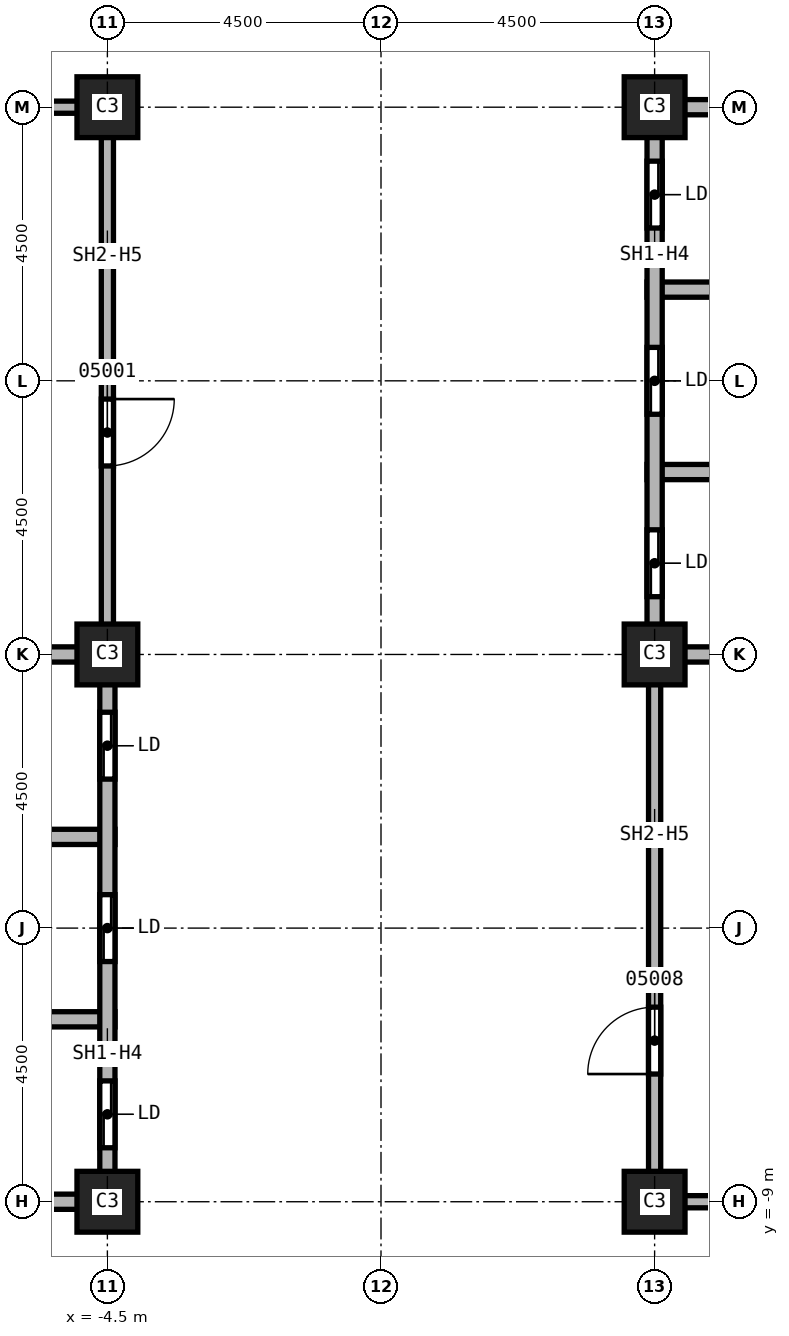
"""IFC4 building model, lengths in metres.
Left out: names, types, materials, properties, quantities, classifications, styles, units other than length and angle.
Written with IfcOpenShell. Run it as: python <this file> out.ifc"""

import sys

from ifc_helpers import new_model, si_unit, direction, frame, frame_2d, origin, origin_2d, place, context, subcontext, project, spatial, rectangle, extrude, element, fill, save


model = new_model("IFC4")
c1 = context("Model", 3, precision=1e-05, world=origin(), true_north=direction((0.0, 1.0)))
c2 = subcontext(c1, "Body", "Model", "MODEL_VIEW")
j1 = project(units=[si_unit("LENGTHUNIT", "METRE"), si_unit("PLANEANGLEUNIT", "RADIAN")], contexts=[c1])
p1 = place(None, origin())
s1 = spatial("IfcSite", under=j1, at=p1, CompositionType="ELEMENT")
p2 = place(p1, origin())
s2 = spatial("IfcBuilding", under=s1, at=p2, CompositionType="ELEMENT")
p3 = place(p2, frame((0.0, 0.0, 116.0)))
s3 = spatial("IfcBuildingStorey", under=s2, at=p3, CompositionType="ELEMENT", Elevation=116.0)
for number, where, z_axis, x_axis in (
    (1, (4.5, 0.0, 0.0), (0.0, 0.0, 1.0), (1.0, 0.0, 0.0)),
    (2, (4.5, 9.0, 0.0), (0.0, 0.0, 1.0), (1.0, 0.0, 0.0)),
    (3, (4.5, -9.0, 0.0), (0.0, 0.0, 1.0), (1.0, 0.0, 0.0)),
    (4, (-4.5, 0.0, 0.0), (0.0, 0.0, 1.0), (1.0, 0.0, 0.0)),
    (5, (-4.5, 9.0, 0.0), (0.0, 0.0, 1.0), (1.0, 0.0, 0.0)),
    (6, (-4.5, -9.0, 0.0), (0.0, 0.0, 1.0), (1.0, 0.0, 0.0)),
):
    element("IfcColumn", number, at=place(p3, frame(where, z_axis=z_axis, x_axis=x_axis)), inside=s3, PredefinedType="COLUMN", context=c2, shape_type="SweptSolid", body=[
        extrude(rectangle(XDim=1.0, YDim=1.0, at=origin_2d()), origin(), (0.0, 0.0, 1.0), 3.6),
    ])
p4 = place(p3, frame((-7.5, 9.0, 0.0), z_axis=(0.0, 0.0, 1.0), x_axis=(1.0, 0.0, 0.0)))
e7 = element("IfcWall", 7, at=p4, inside=s3, PredefinedType="SOLIDWALL", context=c2, shape_type="SweptSolid", body=[
    extrude(rectangle(XDim=3.0, YDim=0.2, at=frame_2d((1.5, 0.0))), origin(), (0.0, 0.0, 1.0), 2.838),
])
p5 = place(p3, frame((-4.5, 9.1, 0.0), z_axis=(0.0, 0.0, 1.0), x_axis=(0.0, -1.0, 0.0)))
e8 = element("IfcWall", 8, at=p5, inside=s3, PredefinedType="SOLIDWALL", context=c2, shape_type="SweptSolid", body=[
    extrude(rectangle(XDim=9.1, YDim=0.2, at=frame_2d((4.55, 0.0))), origin(), (0.0, 0.0, 1.0), 2.838),
])
p6 = place(p5, frame((4.9, 0.0, 0.0)))
e9 = element("IfcOpeningElement", 9, at=p6, cuts=e8, PredefinedType="OPENING", context=c2, shape_type="SweptSolid", body=[
    extrude(rectangle(XDim=1.1, YDim=2.1, at=frame_2d((0.55, 1.05))), frame((0.0, 0.1, 0.0), z_axis=(0.0, -1.0, 0.0), x_axis=(1.0, 0.0, 0.0)), (0.0, 0.0, 1.0), 0.2),
])
p7 = place(p3, frame((4.5, -9.1, 0.0), z_axis=(0.0, 0.0, 1.0), x_axis=(0.0, 1.0, 0.0)))
e10 = element("IfcWall", 10, at=p7, inside=s3, PredefinedType="SOLIDWALL", context=c2, shape_type="SweptSolid", body=[
    extrude(rectangle(XDim=9.1, YDim=0.2, at=frame_2d((4.55, 0.0))), origin(), (0.0, 0.0, 1.0), 2.838),
])
p8 = place(p7, frame((2.2, 0.0, 0.0)))
e11 = element("IfcOpeningElement", 11, at=p8, cuts=e10, PredefinedType="OPENING", context=c2, shape_type="SweptSolid", body=[
    extrude(rectangle(XDim=1.1, YDim=2.1, at=frame_2d((0.55, 1.05))), frame((0.0, 0.1, 0.0), z_axis=(0.0, -1.0, 0.0), x_axis=(1.0, 0.0, 0.0)), (0.0, 0.0, 1.0), 0.2),
])
p9 = place(p3, frame((7.5, -9.0, 0.0), z_axis=(0.0, 0.0, 1.0), x_axis=(-1.0, 0.0, 0.0)))
e12 = element("IfcWall", 12, at=p9, inside=s3, PredefinedType="SOLIDWALL", context=c2, shape_type="SweptSolid", body=[
    extrude(rectangle(XDim=3.0, YDim=0.2, at=frame_2d((1.5, 0.0))), origin(), (0.0, 0.0, 1.0), 2.838),
])
p10 = place(p3, frame((-13.625, -3.0, 0.0), z_axis=(0.0, 0.0, 1.0), x_axis=(1.0, 0.0, 0.0)))
e13 = element("IfcWall", 13, at=p10, inside=s3, PredefinedType="SOLIDWALL", context=c2, shape_type="SweptSolid", body=[
    extrude(rectangle(XDim=9.25, YDim=0.25, at=frame_2d((4.625, 0.0))), origin(), (0.0, 0.0, 1.0), 3.6),
])
p11 = place(p10, frame((3.25, 0.0, 0.0)))
e14 = element("IfcOpeningElement", 14, at=p11, cuts=e13, PredefinedType="OPENING", context=c2, shape_type="SweptSolid", body=[
    extrude(rectangle(XDim=1.1, YDim=2.1, at=frame_2d((0.55, 1.05))), frame((0.0, 0.125, 0.0), z_axis=(0.0, -1.0, 0.0), x_axis=(1.0, 0.0, 0.0)), (0.0, 0.0, 1.0), 0.25),
])
for number, where, z_axis, x_axis in (
    (15, (-7.625, -6.0, 0.0), (0.0, 0.0, 1.0), (1.0, 0.0, 0.0)),
    (16, (-7.625, 0.0, 0.0), (0.0, 0.0, 1.0), (1.0, 0.0, 0.0)),
):
    element("IfcWall", number, at=place(p3, frame(where, z_axis=z_axis, x_axis=x_axis)), inside=s3, PredefinedType="SOLIDWALL", context=c2, shape_type="SweptSolid", body=[
        extrude(rectangle(XDim=3.25, YDim=0.25, at=frame_2d((1.625, 0.0))), origin(), (0.0, 0.0, 1.0), 3.6),
    ])
p12 = place(p3, frame((-4.5, -9.0, 0.0), z_axis=(0.0, 0.0, 1.0), x_axis=(-1.0, 0.0, 0.0)))
e17 = element("IfcWall", 17, at=p12, inside=s3, PredefinedType="SOLIDWALL", context=c2, shape_type="SweptSolid", body=[
    extrude(rectangle(XDim=3.0, YDim=0.25, at=frame_2d((1.5, 0.0))), origin(), (0.0, 0.0, 1.0), 2.838),
])
p13 = place(p3, frame((-4.5, 0.0, 0.0), z_axis=(0.0, 0.0, 1.0), x_axis=(0.0, -1.0, 0.0)))
e18 = element("IfcWall", 18, at=p13, inside=s3, PredefinedType="SOLIDWALL", context=c2, shape_type="SweptSolid", body=[
    extrude(rectangle(XDim=9.125, YDim=0.25, at=frame_2d((4.562, 0.0))), origin(), (0.0, 0.0, 1.0), 2.838),
])
p14 = place(p13, frame((7.012, 0.0, 0.0)))
e19 = element("IfcOpeningElement", 19, at=p14, cuts=e18, PredefinedType="OPENING", context=c2, shape_type="SweptSolid", body=[
    extrude(rectangle(XDim=1.1, YDim=2.1, at=frame_2d((0.55, 1.05))), frame((0.0, 0.125, 0.0), z_axis=(0.0, -1.0, 0.0), x_axis=(1.0, 0.0, 0.0)), (0.0, 0.0, 1.0), 0.25),
])
p15 = place(p13, frame((3.95, 0.0, 0.0)))
e20 = element("IfcOpeningElement", 20, at=p15, cuts=e18, PredefinedType="OPENING", context=c2, shape_type="SweptSolid", body=[
    extrude(rectangle(XDim=1.1, YDim=2.1, at=frame_2d((0.55, 1.05))), frame((0.0, 0.125, 0.0), z_axis=(0.0, -1.0, 0.0), x_axis=(1.0, 0.0, 0.0)), (0.0, 0.0, 1.0), 0.25),
])
p16 = place(p13, frame((0.95, 0.0, 0.0)))
e21 = element("IfcOpeningElement", 21, at=p16, cuts=e18, PredefinedType="OPENING", context=c2, shape_type="SweptSolid", body=[
    extrude(rectangle(XDim=1.1, YDim=2.1, at=frame_2d((0.55, 1.05))), frame((0.0, 0.125, 0.0), z_axis=(0.0, -1.0, 0.0), x_axis=(1.0, 0.0, 0.0)), (0.0, 0.0, 1.0), 0.25),
])
p17 = place(p3, frame((4.375, 0.0, 0.0), z_axis=(0.0, 0.0, 1.0), x_axis=(1.0, 0.0, 0.0)))
e22 = element("IfcWall", 22, at=p17, inside=s3, PredefinedType="SOLIDWALL", context=c2, shape_type="SweptSolid", body=[
    extrude(rectangle(XDim=3.25, YDim=0.25, at=frame_2d((1.625, 0.0))), origin(), (0.0, 0.0, 1.0), 3.6),
])
p18 = place(p3, frame((4.375, 3.0, 0.0), z_axis=(0.0, 0.0, 1.0), x_axis=(1.0, 0.0, 0.0)))
e23 = element("IfcWall", 23, at=p18, inside=s3, PredefinedType="SOLIDWALL", context=c2, shape_type="SweptSolid", body=[
    extrude(rectangle(XDim=9.25, YDim=0.25, at=frame_2d((4.625, 0.0))), origin(), (0.0, 0.0, 1.0), 3.6),
])
p19 = place(p18, frame((4.125, 0.0, 0.0)))
e24 = element("IfcOpeningElement", 24, at=p19, cuts=e23, PredefinedType="OPENING", context=c2, shape_type="SweptSolid", body=[
    extrude(rectangle(XDim=1.1, YDim=2.1, at=frame_2d((0.55, 1.05))), frame((0.0, 0.125, 0.0), z_axis=(0.0, -1.0, 0.0), x_axis=(1.0, 0.0, 0.0)), (0.0, 0.0, 1.0), 0.25),
])
p20 = place(p3, frame((4.375, 6.0, 0.0), z_axis=(0.0, 0.0, 1.0), x_axis=(1.0, 0.0, 0.0)))
e25 = element("IfcWall", 25, at=p20, inside=s3, PredefinedType="SOLIDWALL", context=c2, shape_type="SweptSolid", body=[
    extrude(rectangle(XDim=3.25, YDim=0.25, at=frame_2d((1.625, 0.0))), origin(), (0.0, 0.0, 1.0), 3.6),
])
p21 = place(p3, frame((4.5, 0.0, 0.0), z_axis=(0.0, 0.0, 1.0), x_axis=(0.0, 1.0, 0.0)))
e26 = element("IfcWall", 26, at=p21, inside=s3, PredefinedType="SOLIDWALL", context=c2, shape_type="SweptSolid", body=[
    extrude(rectangle(XDim=9.125, YDim=0.25, at=frame_2d((4.562, 0.0))), origin(), (0.0, 0.0, 1.0), 2.838),
])
p22 = place(p21, frame((0.95, 0.0, 0.0)))
e27 = element("IfcOpeningElement", 27, at=p22, cuts=e26, PredefinedType="OPENING", context=c2, shape_type="SweptSolid", body=[
    extrude(rectangle(XDim=1.1, YDim=2.1, at=frame_2d((0.55, 1.05))), frame((0.0, 0.125, 0.0), z_axis=(0.0, -1.0, 0.0), x_axis=(1.0, 0.0, 0.0)), (0.0, 0.0, 1.0), 0.25),
])
p23 = place(p21, frame((3.95, 0.0, 0.0)))
e28 = element("IfcOpeningElement", 28, at=p23, cuts=e26, PredefinedType="OPENING", context=c2, shape_type="SweptSolid", body=[
    extrude(rectangle(XDim=1.1, YDim=2.1, at=frame_2d((0.55, 1.05))), frame((0.0, 0.125, 0.0), z_axis=(0.0, -1.0, 0.0), x_axis=(1.0, 0.0, 0.0)), (0.0, 0.0, 1.0), 0.25),
])
p24 = place(p21, frame((7.012, 0.0, 0.0)))
e29 = element("IfcOpeningElement", 29, at=p24, cuts=e26, PredefinedType="OPENING", context=c2, shape_type="SweptSolid", body=[
    extrude(rectangle(XDim=1.1, YDim=2.1, at=frame_2d((0.55, 1.05))), frame((0.0, 0.125, 0.0), z_axis=(0.0, -1.0, 0.0), x_axis=(1.0, 0.0, 0.0)), (0.0, 0.0, 1.0), 0.25),
])
p25 = place(p3, frame((4.5, 9.0, 0.0), z_axis=(0.0, 0.0, 1.0), x_axis=(1.0, 0.0, 0.0)))
e30 = element("IfcWall", 30, at=p25, inside=s3, PredefinedType="SOLIDWALL", context=c2, shape_type="SweptSolid", body=[
    extrude(rectangle(XDim=3.0, YDim=0.25, at=frame_2d((1.5, 0.0))), origin(), (0.0, 0.0, 1.0), 2.838),
])
p26 = place(p6, origin())
e31 = element("IfcDoor", 31, at=p26, inside=s3, OperationType="SINGLE_SWING_RIGHT", PredefinedType="DOOR", context=c2, shape_type="SweptSolid", body=[
    extrude(rectangle(XDim=1.1, YDim=2.1, at=frame_2d((0.55, 1.05))), frame((0.0, 0.025, 0.0), z_axis=(0.0, -1.0, 0.0), x_axis=(1.0, 0.0, 0.0)), (0.0, 0.0, 1.0), 0.05),
])
fill(e9, e31)
p27 = place(p8, origin())
e32 = element("IfcDoor", 32, at=p27, inside=s3, OperationType="SINGLE_SWING_LEFT", PredefinedType="DOOR", context=c2, shape_type="SweptSolid", body=[
    extrude(rectangle(XDim=1.1, YDim=2.1, at=frame_2d((0.55, 1.05))), frame((0.0, 0.025, 0.0), z_axis=(0.0, -1.0, 0.0), x_axis=(1.0, 0.0, 0.0)), (0.0, 0.0, 1.0), 0.05),
])
fill(e11, e32)
p28 = place(p14, origin())
e33 = element("IfcDoor", 33, at=p28, inside=s3, OperationType="SLIDING_TO_LEFT", PredefinedType="DOOR", context=c2, shape_type="SweptSolid", body=[
    extrude(rectangle(XDim=1.1, YDim=2.1, at=frame_2d((0.55, 1.05))), frame((0.0, 0.025, 0.0), z_axis=(0.0, -1.0, 0.0), x_axis=(1.0, 0.0, 0.0)), (0.0, 0.0, 1.0), 0.05),
])
fill(e19, e33)
p29 = place(p15, origin())
e34 = element("IfcDoor", 34, at=p29, inside=s3, OperationType="SLIDING_TO_LEFT", PredefinedType="DOOR", context=c2, shape_type="SweptSolid", body=[
    extrude(rectangle(XDim=1.1, YDim=2.1, at=frame_2d((0.55, 1.05))), frame((0.0, 0.025, 0.0), z_axis=(0.0, -1.0, 0.0), x_axis=(1.0, 0.0, 0.0)), (0.0, 0.0, 1.0), 0.05),
])
fill(e20, e34)
p30 = place(p16, origin())
e35 = element("IfcDoor", 35, at=p30, inside=s3, OperationType="SLIDING_TO_LEFT", PredefinedType="DOOR", context=c2, shape_type="SweptSolid", body=[
    extrude(rectangle(XDim=1.1, YDim=2.1, at=frame_2d((0.55, 1.05))), frame((0.0, 0.025, 0.0), z_axis=(0.0, -1.0, 0.0), x_axis=(1.0, 0.0, 0.0)), (0.0, 0.0, 1.0), 0.05),
])
fill(e21, e35)
p31 = place(p22, origin())
e36 = element("IfcDoor", 36, at=p31, inside=s3, OperationType="SLIDING_TO_LEFT", PredefinedType="DOOR", context=c2, shape_type="SweptSolid", body=[
    extrude(rectangle(XDim=1.1, YDim=2.1, at=frame_2d((0.55, 1.05))), frame((0.0, 0.025, 0.0), z_axis=(0.0, -1.0, 0.0), x_axis=(1.0, 0.0, 0.0)), (0.0, 0.0, 1.0), 0.05),
])
fill(e27, e36)
p32 = place(p23, origin())
e37 = element("IfcDoor", 37, at=p32, inside=s3, OperationType="SLIDING_TO_LEFT", PredefinedType="DOOR", context=c2, shape_type="SweptSolid", body=[
    extrude(rectangle(XDim=1.1, YDim=2.1, at=frame_2d((0.55, 1.05))), frame((0.0, 0.025, 0.0), z_axis=(0.0, -1.0, 0.0), x_axis=(1.0, 0.0, 0.0)), (0.0, 0.0, 1.0), 0.05),
])
fill(e28, e37)
p33 = place(p24, origin())
e38 = element("IfcDoor", 38, at=p33, inside=s3, OperationType="SLIDING_TO_LEFT", PredefinedType="DOOR", context=c2, shape_type="SweptSolid", body=[
    extrude(rectangle(XDim=1.1, YDim=2.1, at=frame_2d((0.55, 1.05))), frame((0.0, 0.025, 0.0), z_axis=(0.0, -1.0, 0.0), x_axis=(1.0, 0.0, 0.0)), (0.0, 0.0, 1.0), 0.05),
])
fill(e29, e38)
save(model, sys.argv[1])
